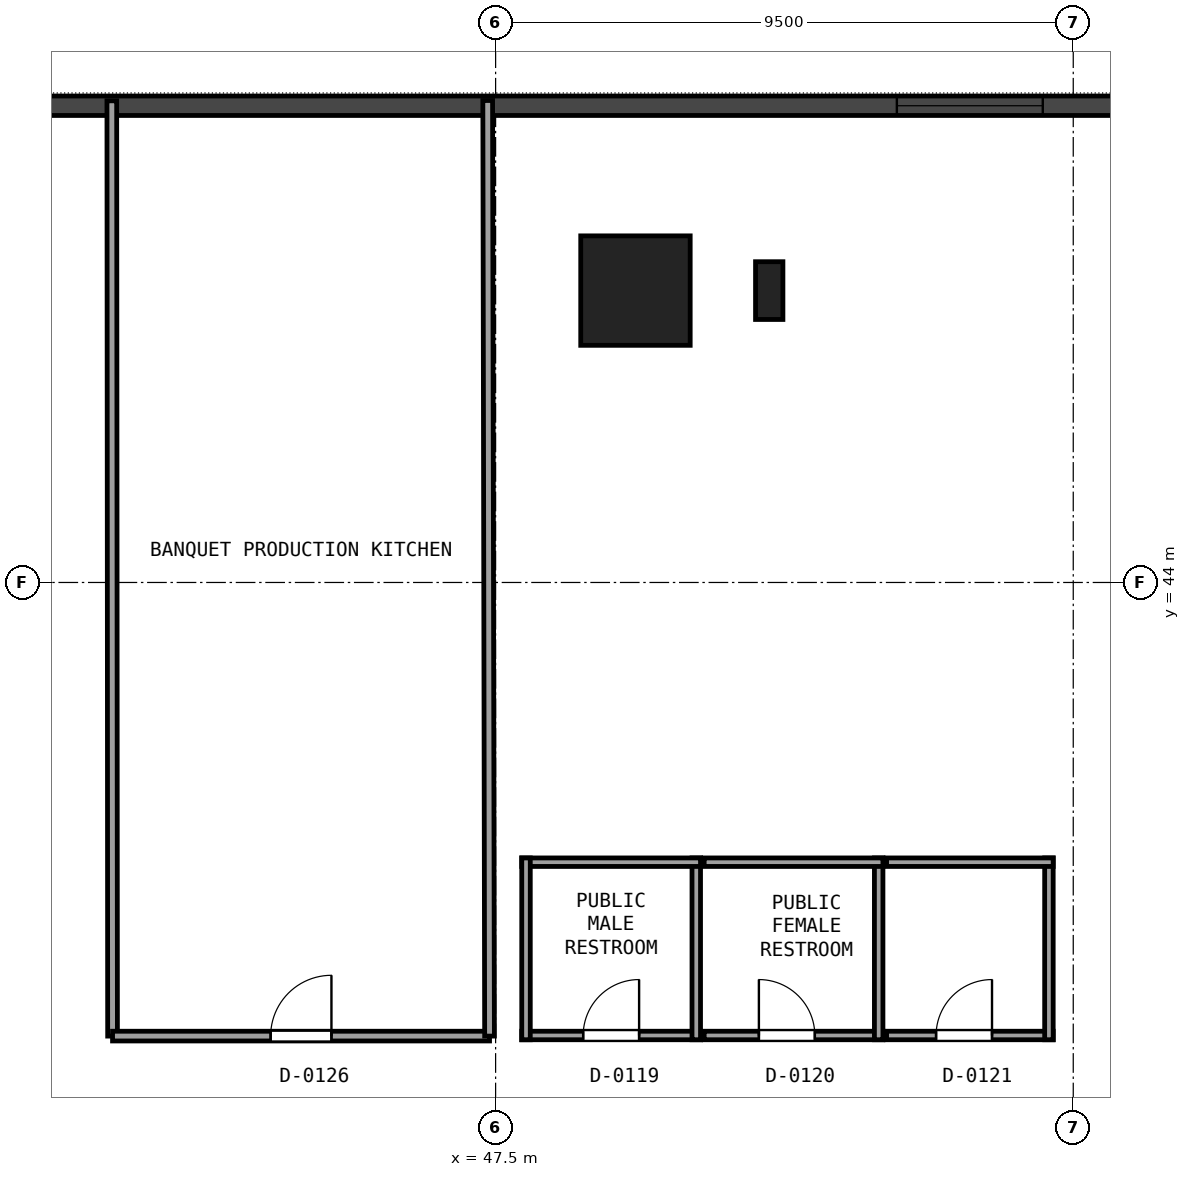
"""IFC4 building model, lengths in metres.
Left out: names, types, materials, properties, quantities, classifications, styles, units other than length and angle.
Written with IfcOpenShell. Run it as: python <this file> out.ifc"""

import sys

from ifc_helpers import new_model, si_unit, direction, frame, frame_2d, origin, origin_2d, place, context, subcontext, project, spatial, rectangle, extrude, element, fill, save


model = new_model("IFC4")
c1 = context("Model", 3, precision=1e-05, world=origin(), true_north=direction((0.0, 1.0)))
c2 = subcontext(c1, "Body", "Model", "MODEL_VIEW")
j1 = project(units=[si_unit("LENGTHUNIT", "METRE"), si_unit("PLANEANGLEUNIT", "RADIAN")], contexts=[c1])
p1 = place(None, origin())
s1 = spatial("IfcSite", under=j1, at=p1, CompositionType="ELEMENT")
p2 = place(p1, origin())
s2 = spatial("IfcBuilding", under=s1, at=p2, CompositionType="ELEMENT")
p3 = place(p2, frame((0.0, 0.0, 5.4)))
s3 = spatial("IfcBuildingStorey", under=s2, at=p3, CompositionType="ELEMENT", Elevation=5.4)
p4 = place(p3, frame((49.8, 48.8, 0.0), z_axis=(0.0, 0.0, 1.0), x_axis=(1.0, 0.0, 0.0)))
e1 = element("IfcColumn", 1, at=p4, inside=s3, PredefinedType="COLUMN", context=c2, shape_type="SweptSolid", body=[
    extrude(rectangle(XDim=1.8, YDim=1.8, at=origin_2d()), origin(), (0.0, 0.0, 1.0), 5.05),
])
p5 = place(p3, frame((52.0, 48.8, 0.0), z_axis=(0.0, 0.0, 1.0), x_axis=(1.0, 0.0, 0.0)))
e2 = element("IfcColumn", 2, at=p5, inside=s3, PredefinedType="PILASTER", context=c2, shape_type="SweptSolid", body=[
    extrude(rectangle(XDim=0.45, YDim=0.95, at=origin_2d()), origin(), (0.0, 0.0, 1.0), 5.05),
])
p6 = place(p3, frame((1.96, 51.84, 0.0), z_axis=(0.0, 0.0, 1.0), x_axis=(1.0, 0.0, 0.0)))
e3 = element("IfcWall", 3, at=p6, inside=s3, PredefinedType="SOLIDWALL", context=c2, shape_type="SweptSolid", body=[
    extrude(rectangle(XDim=72.08, YDim=0.32, at=frame_2d((36.04, 0.0))), origin(), (0.0, 0.0, 1.0), 5.05),
])
p7 = place(p6, frame((14.658, 0.0, 0.95)))
e4 = element("IfcOpeningElement", 4, at=p7, cuts=e3, PredefinedType="OPENING", context=c2, shape_type="SweptSolid", body=[
    extrude(rectangle(XDim=2.4, YDim=2.5, at=frame_2d((1.2, 1.25))), frame((0.0, 0.17, 0.0), z_axis=(0.0, -1.0, 0.0), x_axis=(1.0, 0.0, 0.0)), (0.0, 0.0, 1.0), 0.34),
])
p8 = place(p6, frame((33.398, 0.0, 0.95)))
e5 = element("IfcOpeningElement", 5, at=p8, cuts=e3, PredefinedType="OPENING", context=c2, shape_type="SweptSolid", body=[
    extrude(rectangle(XDim=2.4, YDim=2.5, at=frame_2d((1.2, 1.25))), frame((0.0, 0.17, 0.0), z_axis=(0.0, -1.0, 0.0), x_axis=(1.0, 0.0, 0.0)), (0.0, 0.0, 1.0), 0.34),
])
p9 = place(p6, frame((52.139, 0.0, 0.95)))
e6 = element("IfcOpeningElement", 6, at=p9, cuts=e3, PredefinedType="OPENING", context=c2, shape_type="SweptSolid", body=[
    extrude(rectangle(XDim=2.4, YDim=2.5, at=frame_2d((1.2, 1.25))), frame((0.0, 0.17, 0.0), z_axis=(0.0, -1.0, 0.0), x_axis=(1.0, 0.0, 0.0)), (0.0, 0.0, 1.0), 0.34),
])
p10 = place(p3, frame((47.93, 36.55, 0.0), z_axis=(0.0, 0.0, 1.0), x_axis=(1.0, 0.0, 0.0)))
e7 = element("IfcWall", 7, at=p10, inside=s3, PredefinedType="PARTITIONING", context=c2, shape_type="SweptSolid", body=[
    extrude(rectangle(XDim=2.94, YDim=0.14, at=frame_2d((1.47, 0.0))), origin(), (0.0, 0.0, 1.0), 4.135),
])
p11 = place(p10, frame((1.01, 0.0, 0.0)))
e8 = element("IfcOpeningElement", 8, at=p11, cuts=e7, PredefinedType="OPENING", context=c2, shape_type="SweptSolid", body=[
    extrude(rectangle(XDim=0.92, YDim=2.1, at=frame_2d((0.46, 1.05))), frame((0.0, 0.08, 0.0), z_axis=(0.0, -1.0, 0.0), x_axis=(1.0, 0.0, 0.0)), (0.0, 0.0, 1.0), 0.16),
])
p12 = place(p3, frame((50.8, 36.48, 0.0), z_axis=(0.0, 0.0, 1.0), x_axis=(0.0, 1.0, 0.0)))
e9 = element("IfcWall", 9, at=p12, inside=s3, PredefinedType="PARTITIONING", context=c2, shape_type="SweptSolid", body=[
    extrude(rectangle(XDim=2.99, YDim=0.14, at=frame_2d((1.495, 0.0))), origin(), (0.0, 0.0, 1.0), 4.679),
])
p13 = place(p3, frame((50.87, 39.4, 0.0), z_axis=(0.0, 0.0, 1.0), x_axis=(-1.0, 0.0, 0.0)))
e10 = element("IfcWall", 10, at=p13, inside=s3, PredefinedType="PARTITIONING", context=c2, shape_type="SweptSolid", body=[
    extrude(rectangle(XDim=2.94, YDim=0.14, at=frame_2d((1.47, 0.0))), origin(), (0.0, 0.0, 1.0), 4.135),
])
p14 = place(p3, frame((48.0, 39.47, 0.0), z_axis=(0.0, 0.0, 1.0), x_axis=(0.0, -1.0, 0.0)))
e11 = element("IfcWall", 11, at=p14, inside=s3, PredefinedType="PARTITIONING", context=c2, shape_type="SweptSolid", body=[
    extrude(rectangle(XDim=2.99, YDim=0.14, at=frame_2d((1.495, 0.0))), origin(), (0.0, 0.0, 1.0), 4.135),
])
p15 = place(p3, frame((50.93, 36.55, 0.0), z_axis=(0.0, 0.0, 1.0), x_axis=(1.0, 0.0, 0.0)))
e12 = element("IfcWall", 12, at=p15, inside=s3, PredefinedType="PARTITIONING", context=c2, shape_type="SweptSolid", body=[
    extrude(rectangle(XDim=2.94, YDim=0.14, at=frame_2d((1.47, 0.0))), origin(), (0.0, 0.0, 1.0), 5.05),
])
p16 = place(p15, frame((0.9, 0.0, 0.0)))
e13 = element("IfcOpeningElement", 13, at=p16, cuts=e12, PredefinedType="OPENING", context=c2, shape_type="SweptSolid", body=[
    extrude(rectangle(XDim=0.92, YDim=2.1, at=frame_2d((0.46, 1.05))), frame((0.0, 0.08, 0.0), z_axis=(0.0, -1.0, 0.0), x_axis=(1.0, 0.0, 0.0)), (0.0, 0.0, 1.0), 0.16),
])
p17 = place(p3, frame((53.8, 36.48, 0.0), z_axis=(0.0, 0.0, 1.0), x_axis=(0.0, 1.0, 0.0)))
e14 = element("IfcWall", 14, at=p17, inside=s3, PredefinedType="PARTITIONING", context=c2, shape_type="SweptSolid", body=[
    extrude(rectangle(XDim=2.99, YDim=0.14, at=frame_2d((1.495, 0.0))), origin(), (0.0, 0.0, 1.0), 4.679),
])
p18 = place(p3, frame((53.87, 39.4, 0.0), z_axis=(0.0, 0.0, 1.0), x_axis=(-1.0, 0.0, 0.0)))
e15 = element("IfcWall", 15, at=p18, inside=s3, PredefinedType="PARTITIONING", context=c2, shape_type="SweptSolid", body=[
    extrude(rectangle(XDim=2.94, YDim=0.14, at=frame_2d((1.47, 0.0))), origin(), (0.0, 0.0, 1.0), 4.679),
])
p19 = place(p3, frame((53.93, 36.55, 0.0), z_axis=(0.0, 0.0, 1.0), x_axis=(1.0, 0.0, 0.0)))
e16 = element("IfcWall", 16, at=p19, inside=s3, PredefinedType="PARTITIONING", context=c2, shape_type="SweptSolid", body=[
    extrude(rectangle(XDim=2.74, YDim=0.14, at=frame_2d((1.37, 0.0))), origin(), (0.0, 0.0, 1.0), 5.05),
])
p20 = place(p19, frame((0.814, 0.0, 0.0)))
e17 = element("IfcOpeningElement", 17, at=p20, cuts=e16, PredefinedType="OPENING", context=c2, shape_type="SweptSolid", body=[
    extrude(rectangle(XDim=0.92, YDim=2.1, at=frame_2d((0.46, 1.05))), frame((0.0, 0.08, 0.0), z_axis=(0.0, -1.0, 0.0), x_axis=(1.0, 0.0, 0.0)), (0.0, 0.0, 1.0), 0.16),
])
p21 = place(p3, frame((56.6, 36.48, 0.0), z_axis=(0.0, 0.0, 1.0), x_axis=(0.0, 1.0, 0.0)))
e18 = element("IfcWall", 18, at=p21, inside=s3, PredefinedType="PARTITIONING", context=c2, shape_type="SweptSolid", body=[
    extrude(rectangle(XDim=2.99, YDim=0.14, at=frame_2d((1.495, 0.0))), origin(), (0.0, 0.0, 1.0), 4.679),
])
p22 = place(p3, frame((56.67, 39.4, 0.0), z_axis=(0.0, 0.0, 1.0), x_axis=(-1.0, 0.0, 0.0)))
e19 = element("IfcWall", 19, at=p22, inside=s3, PredefinedType="PARTITIONING", context=c2, shape_type="SweptSolid", body=[
    extrude(rectangle(XDim=2.74, YDim=0.14, at=frame_2d((1.37, 0.0))), origin(), (0.0, 0.0, 1.0), 4.679),
])
p23 = place(p3, frame((41.188, 51.921, 0.0), z_axis=(0.0, 0.0, 1.0), x_axis=(0.000777777543, -0.999999697531, 0.0)))
e20 = element("IfcWall", 20, at=p23, inside=s3, PredefinedType="PARTITIONING", context=c2, shape_type="SweptSolid", body=[
    extrude(rectangle(XDim=15.381, YDim=0.16, at=frame_2d((7.69, 0.0))), origin(), (0.0, 0.0, 1.0), 4.123),
])
p24 = place(p3, frame((41.2, 36.54, 0.0), z_axis=(0.0, 0.0, 1.0), x_axis=(1.0, 0.0, 0.0)))
e21 = element("IfcWall", 21, at=p24, inside=s3, PredefinedType="PARTITIONING", context=c2, shape_type="SweptSolid", body=[
    extrude(rectangle(XDim=6.2, YDim=0.16, at=frame_2d((3.1, 0.0))), origin(), (0.0, 0.0, 1.0), 5.05),
])
p25 = place(p24, frame((2.6, 0.0, 0.0)))
e22 = element("IfcOpeningElement", 22, at=p25, cuts=e21, PredefinedType="OPENING", context=c2, shape_type="SweptSolid", body=[
    extrude(rectangle(XDim=1.0, YDim=2.15, at=frame_2d((0.5, 1.075))), frame((0.0, 0.09, 0.0), z_axis=(0.0, -1.0, 0.0), x_axis=(1.0, 0.0, 0.0)), (0.0, 0.0, 1.0), 0.18),
])
p26 = place(p3, frame((47.4, 36.54, 0.0), z_axis=(0.0, 0.0, 1.0), x_axis=(-0.001935859022, 0.999998126223, 0.0)))
e23 = element("IfcWall", 23, at=p26, inside=s3, PredefinedType="PARTITIONING", context=c2, shape_type="SweptSolid", body=[
    extrude(rectangle(XDim=15.386, YDim=0.16, at=frame_2d((7.693, 0.0))), origin(), (0.0, 0.0, 1.0), 4.123),
])
p27 = place(p9, origin())
e24 = element("IfcWindow", 24, at=p27, inside=s3, PartitioningType="SINGLE_PANEL", PredefinedType="WINDOW", context=c2, shape_type="SweptSolid", body=[
    extrude(rectangle(XDim=2.4, YDim=2.5, at=frame_2d((1.2, 1.25))), frame((0.0, 0.03, 0.0), z_axis=(0.0, -1.0, 0.0), x_axis=(1.0, 0.0, 0.0)), (0.0, 0.0, 1.0), 0.06),
])
fill(e6, e24)
p28 = place(p11, origin())
e25 = element("IfcDoor", 25, at=p28, inside=s3, OperationType="SINGLE_SWING_RIGHT", PredefinedType="DOOR", context=c2, shape_type="SweptSolid", body=[
    extrude(rectangle(XDim=0.92, YDim=2.1, at=frame_2d((0.46, 1.05))), frame((0.0, 0.025, 0.0), z_axis=(0.0, -1.0, 0.0), x_axis=(1.0, 0.0, 0.0)), (0.0, 0.0, 1.0), 0.05),
])
fill(e8, e25)
p29 = place(p16, origin())
e26 = element("IfcDoor", 26, at=p29, inside=s3, OperationType="SINGLE_SWING_LEFT", PredefinedType="DOOR", context=c2, shape_type="SweptSolid", body=[
    extrude(rectangle(XDim=0.92, YDim=2.1, at=frame_2d((0.46, 1.05))), frame((0.0, 0.025, 0.0), z_axis=(0.0, -1.0, 0.0), x_axis=(1.0, 0.0, 0.0)), (0.0, 0.0, 1.0), 0.05),
])
fill(e13, e26)
p30 = place(p20, origin())
e27 = element("IfcDoor", 27, at=p30, inside=s3, OperationType="SINGLE_SWING_RIGHT", PredefinedType="DOOR", context=c2, shape_type="SweptSolid", body=[
    extrude(rectangle(XDim=0.92, YDim=2.1, at=frame_2d((0.46, 1.05))), frame((0.0, 0.025, 0.0), z_axis=(0.0, -1.0, 0.0), x_axis=(1.0, 0.0, 0.0)), (0.0, 0.0, 1.0), 0.05),
])
fill(e17, e27)
p31 = place(p25, origin())
e28 = element("IfcDoor", 28, at=p31, inside=s3, OperationType="SINGLE_SWING_RIGHT", PredefinedType="DOOR", context=c2, shape_type="SweptSolid", body=[
    extrude(rectangle(XDim=1.0, YDim=2.15, at=frame_2d((0.5, 1.075))), frame((0.0, 0.025, 0.0), z_axis=(0.0, -1.0, 0.0), x_axis=(1.0, 0.0, 0.0)), (0.0, 0.0, 1.0), 0.05),
])
fill(e22, e28)
save(model, sys.argv[1])
